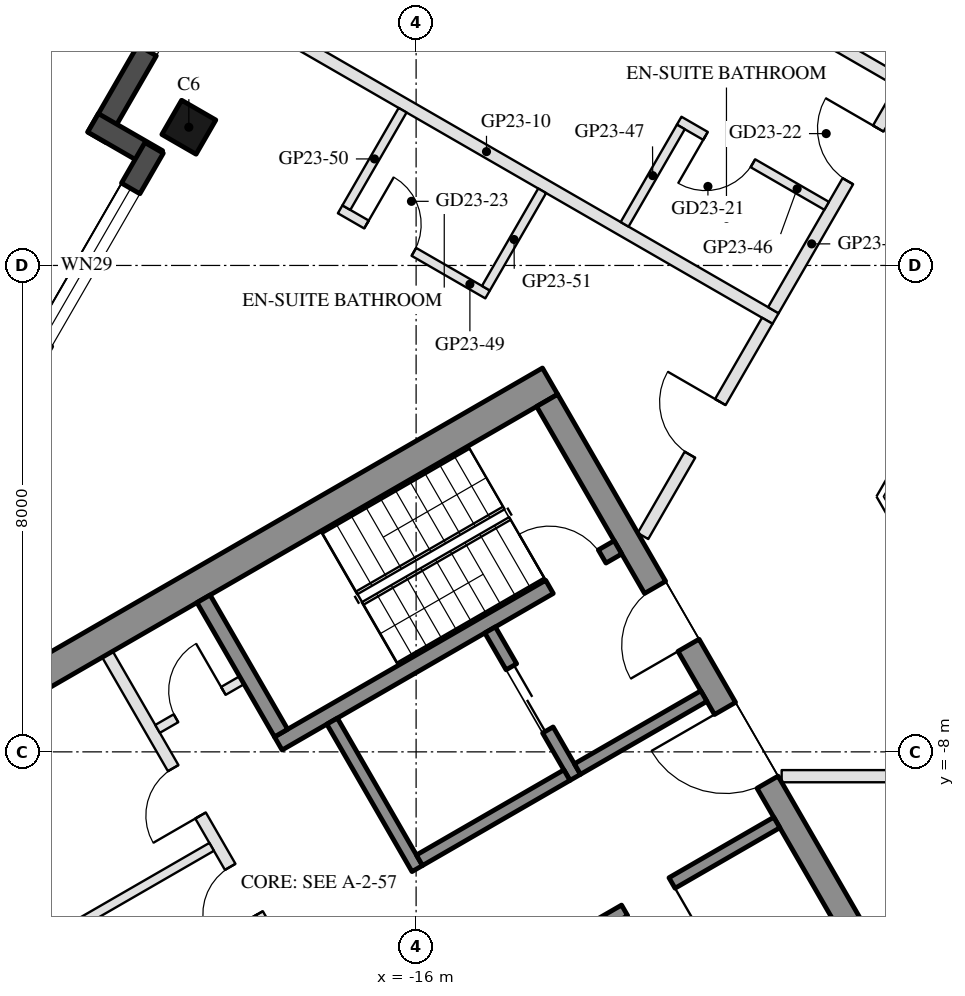
"""IFC4 building model, lengths in metres.
Left out: names, types, materials, properties, quantities, classifications, styles, units other than length and angle.
Written with IfcOpenShell. Run it as: python <this file> out.ifc"""

import sys

from ifc_helpers import new_model, si_unit, direction, frame, frame_2d, origin, origin_2d, place, context, subcontext, project, spatial, rectangle, hollow_rectangle, extrude, element, fill, save


model = new_model("IFC4")
c1 = context("Model", 3, precision=1e-05, world=origin(), true_north=direction((0.0, 1.0)))
c2 = subcontext(c1, "Body", "Model", "MODEL_VIEW")
j1 = project(units=[si_unit("LENGTHUNIT", "METRE"), si_unit("PLANEANGLEUNIT", "RADIAN")], contexts=[c1])
p1 = place(None, origin())
s1 = spatial("IfcSite", under=j1, at=p1, CompositionType="ELEMENT")
p2 = place(p1, origin())
s2 = spatial("IfcBuilding", under=s1, at=p2, CompositionType="ELEMENT")
p3 = place(p2, frame((0.0, 0.0, 246.7)))
s3 = spatial("IfcBuildingStorey", under=s2, at=p3, CompositionType="ELEMENT", Elevation=246.7)
p4 = place(p3, frame((-19.738, 2.273, 0.0), z_axis=(0.0, 0.0, 1.0), x_axis=(0.5, 0.866025403784, 0.0)))
e1 = element("IfcColumn", 1, at=p4, inside=s3, PredefinedType="COLUMN", context=c2, shape_type="SweptSolid", body=[
    extrude(hollow_rectangle(XDim=0.65, YDim=0.65, WallThickness=0.03, at=origin_2d()), origin(), (0.0, 0.0, 1.0), 3.7),
])
p5 = place(p3, frame((-16.398, 10.507, 0.0), z_axis=(0.0, 0.0, 1.0), x_axis=(-0.499999142773, -0.866025898704, 0.0)))
e2 = element("IfcWall", 2, at=p5, inside=s3, PredefinedType="SOLIDWALL", context=c2, shape_type="SweptSolid", body=[
    extrude(rectangle(XDim=9.7, YDim=0.35, at=frame_2d((4.85, 0.0))), origin(), (0.0, 0.0, 1.0), 3.55),
])
p6 = place(p5, frame((2.75, 0.0, 0.0)))
e3 = element("IfcOpeningElement", 3, at=p6, cuts=e2, PredefinedType="OPENING", context=c2, shape_type="SweptSolid", body=[
    extrude(rectangle(XDim=1.8, YDim=2.4, at=frame_2d((0.9, 1.2))), frame((0.0, 0.185, 0.0), z_axis=(0.0, -1.0, 0.0), x_axis=(1.0, 0.0, 0.0)), (0.0, 0.0, 1.0), 0.37),
])
p7 = place(p5, frame((4.85, 0.0, 0.3)))
e4 = element("IfcOpeningElement", 4, at=p7, cuts=e2, PredefinedType="OPENING", context=c2, shape_type="SweptSolid", body=[
    extrude(rectangle(XDim=1.3, YDim=2.65, at=frame_2d((0.65, 1.325))), frame((0.0, 0.185, 0.0), z_axis=(0.0, -1.0, 0.0), x_axis=(1.0, 0.0, 0.0)), (0.0, 0.0, 1.0), 0.37),
])
p8 = place(p5, frame((7.15, 0.0, 0.3)))
e5 = element("IfcOpeningElement", 5, at=p8, cuts=e2, PredefinedType="OPENING", context=c2, shape_type="SweptSolid", body=[
    extrude(rectangle(XDim=0.9, YDim=2.65, at=frame_2d((0.45, 1.325))), frame((0.0, 0.185, 0.0), z_axis=(0.0, -1.0, 0.0), x_axis=(1.0, 0.0, 0.0)), (0.0, 0.0, 1.0), 0.37),
])
p9 = place(p3, frame((-21.312, 2.346, 0.0), z_axis=(0.0, 0.0, 1.0), x_axis=(0.866005645448, -0.500034220881, 0.0)))
e6 = element("IfcWall", 6, at=p9, inside=s3, PredefinedType="SOLIDWALL", context=c2, shape_type="SweptSolid", body=[
    extrude(rectangle(XDim=1.22, YDim=0.35, at=frame_2d((0.61, 0.0))), origin(), (0.0, 0.0, 1.0), 3.55),
])
p10 = place(p3, frame((-20.309, 1.934, 0.0), z_axis=(0.0, 0.0, 1.0), x_axis=(-0.499992114976, -0.866029956157, 0.0)))
e7 = element("IfcWall", 7, at=p10, inside=s3, PredefinedType="SOLIDWALL", context=c2, shape_type="SweptSolid", body=[
    extrude(rectangle(XDim=6.74, YDim=0.35, at=frame_2d((3.37, 0.0))), origin(), (0.0, 0.0, 1.0), 3.55),
])
p11 = place(p10, frame((4.02, 0.0, 0.0)))
e8 = element("IfcOpeningElement", 8, at=p11, cuts=e7, PredefinedType="OPENING", context=c2, shape_type="SweptSolid", body=[
    extrude(rectangle(XDim=2.4, YDim=2.4, at=frame_2d((1.2, 1.2))), frame((0.0, 0.185, 0.0), z_axis=(0.0, -1.0, 0.0), x_axis=(1.0, 0.0, 0.0)), (0.0, 0.0, 1.0), 0.37),
])
p12 = place(p10, frame((0.77, 0.0, 0.3)))
e9 = element("IfcOpeningElement", 9, at=p12, cuts=e7, PredefinedType="OPENING", context=c2, shape_type="SweptSolid", body=[
    extrude(rectangle(XDim=2.9, YDim=2.65, at=frame_2d((1.45, 1.325))), frame((0.0, 0.185, 0.0), z_axis=(0.0, -1.0, 0.0), x_axis=(1.0, 0.0, 0.0)), (0.0, 0.0, 1.0), 0.37),
])
p13 = place(p3, frame((-13.797, -1.903, 0.0), z_axis=(0.0, 0.0, 1.0), x_axis=(-0.866025009528, -0.500000682871, 0.0)))
e10 = element("IfcWall", 10, at=p13, inside=s3, PredefinedType="SHEAR", context=c2, shape_type="SweptSolid", body=[
    extrude(rectangle(XDim=14.837, YDim=0.5, at=frame_2d((7.418, 0.0))), origin(), (0.0, 0.0, 1.0), 3.5),
])
p14 = place(p3, frame((-13.845, -2.22, 0.0), z_axis=(0.0, 0.0, 1.0), x_axis=(0.500004234368, -0.866022959057, 0.0)))
e11 = element("IfcWall", 11, at=p14, inside=s3, PredefinedType="SHEAR", context=c2, shape_type="SweptSolid", body=[
    extrude(rectangle(XDim=10.0, YDim=0.4, at=frame_2d((5.0, 0.0))), origin(), (0.0, 0.0, 1.0), 3.5),
])
p15 = place(p14, frame((3.55, 0.0, 0.0)))
e12 = element("IfcOpeningElement", 12, at=p15, cuts=e11, PredefinedType="OPENING", context=c2, shape_type="SweptSolid", body=[
    extrude(rectangle(XDim=1.1, YDim=2.1, at=frame_2d((0.55, 1.05))), frame((0.0, 0.21, 0.0), z_axis=(0.0, -1.0, 0.0), x_axis=(1.0, 0.0, 0.0)), (0.0, 0.0, 1.0), 0.42),
])
p16 = place(p14, frame((5.85, 0.0, 0.0)))
e13 = element("IfcOpeningElement", 13, at=p16, cuts=e11, PredefinedType="OPENING", context=c2, shape_type="SweptSolid", body=[
    extrude(rectangle(XDim=1.4, YDim=2.1, at=frame_2d((0.7, 1.05))), frame((0.0, 0.21, 0.0), z_axis=(0.0, -1.0, 0.0), x_axis=(1.0, 0.0, 0.0)), (0.0, 0.0, 1.0), 0.42),
])
p17 = place(p3, frame((-12.681, -4.636, 0.0), z_axis=(0.0, 0.0, 1.0), x_axis=(-0.866021702275, -0.500006411147, 0.0)))
e14 = element("IfcWall", 14, at=p17, inside=s3, PredefinedType="SHEAR", context=c2, shape_type="SweptSolid", body=[
    extrude(rectangle(XDim=6.45, YDim=0.25, at=frame_2d((3.225, 0.0))), origin(), (0.0, 0.0, 1.0), 3.5),
])
p18 = place(p17, frame((0.3, 0.0, 0.0)))
e15 = element("IfcOpeningElement", 15, at=p18, cuts=e14, PredefinedType="OPENING", context=c2, shape_type="SweptSolid", body=[
    extrude(rectangle(XDim=1.0, YDim=2.1, at=frame_2d((0.5, 1.05))), frame((0.0, 0.135, 0.0), z_axis=(0.0, -1.0, 0.0), x_axis=(1.0, 0.0, 0.0)), (0.0, 0.0, 1.0), 0.27),
])
p19 = place(p3, frame((-19.496, -5.482, 0.0), z_axis=(0.0, 0.0, 1.0), x_axis=(0.499990435942, -0.866030925526, 0.0)))
e16 = element("IfcWall", 16, at=p19, inside=s3, PredefinedType="SHEAR", context=c2, shape_type="SweptSolid", body=[
    extrude(rectangle(XDim=2.55, YDim=0.25, at=frame_2d((1.275, 0.0))), origin(), (0.0, 0.0, 1.0), 3.5),
])
p20 = place(p3, frame((-17.381, -7.495, 0.0), z_axis=(0.0, 0.0, 1.0), x_axis=(0.500011755427, -0.866018616679, 0.0)))
e17 = element("IfcWall", 17, at=p20, inside=s3, PredefinedType="SHEAR", context=c2, shape_type="SweptSolid", body=[
    extrude(rectangle(XDim=2.8, YDim=0.2, at=frame_2d((1.4, 0.0))), origin(), (0.0, 0.0, 1.0), 3.5),
])
p21 = place(p3, frame((-14.783, -5.995, 0.0), z_axis=(0.0, 0.0, 1.0), x_axis=(0.49994636267, -0.866056369097, 0.0)))
e18 = element("IfcWall", 18, at=p21, inside=s3, PredefinedType="SHEAR", context=c2, shape_type="SweptSolid", body=[
    extrude(rectangle(XDim=2.8, YDim=0.2, at=frame_2d((1.4, 0.0))), origin(), (0.0, 0.0, 1.0), 3.5),
])
p22 = place(p21, frame((0.7, 0.0, 0.0)))
e19 = element("IfcOpeningElement", 19, at=p22, cuts=e18, PredefinedType="OPENING", context=c2, shape_type="SweptSolid", body=[
    extrude(rectangle(XDim=1.2, YDim=2.1, at=frame_2d((0.6, 1.05))), frame((0.0, 0.11, 0.0), z_axis=(0.0, -1.0, 0.0), x_axis=(1.0, 0.0, 0.0)), (0.0, 0.0, 1.0), 0.22),
])
p23 = place(p3, frame((-13.52, -8.383, 0.0), z_axis=(0.0, 0.0, 1.0), x_axis=(-0.866034573852, -0.49998411664, 0.0)))
e20 = element("IfcWall", 20, at=p23, inside=s3, PredefinedType="SHEAR", context=c2, shape_type="SweptSolid", body=[
    extrude(rectangle(XDim=2.8, YDim=0.2, at=frame_2d((1.4, 0.0))), origin(), (0.0, 0.0, 1.0), 3.5),
])
p24 = place(p3, frame((-11.268, -7.083, 0.0), z_axis=(0.0, 0.0, 1.0), x_axis=(-0.866050077142, -0.499957262057, 0.0)))
e21 = element("IfcWall", 21, at=p24, inside=s3, PredefinedType="SHEAR", context=c2, shape_type="SweptSolid", body=[
    extrude(rectangle(XDim=2.4, YDim=0.2, at=frame_2d((1.2, 0.0))), origin(), (0.0, 0.0, 1.0), 3.5),
])
p25 = place(p3, frame((-10.068, -9.162, 0.0), z_axis=(0.0, 0.0, 1.0), x_axis=(-0.866032725843, -0.499987317609, 0.0)))
e22 = element("IfcWall", 22, at=p25, inside=s3, PredefinedType="SHEAR", context=c2, shape_type="SweptSolid", body=[
    extrude(rectangle(XDim=10.16, YDim=0.2, at=frame_2d((5.08, 0.0))), origin(), (0.0, 0.0, 1.0), 3.5),
])
p26 = place(p25, frame((1.99, 0.0, 0.0)))
e23 = element("IfcOpeningElement", 23, at=p26, cuts=e22, PredefinedType="OPENING", context=c2, shape_type="SweptSolid", body=[
    extrude(rectangle(XDim=0.9, YDim=2.1, at=frame_2d((0.45, 1.05))), frame((0.0, 0.11, 0.0), z_axis=(0.0, -1.0, 0.0), x_axis=(1.0, 0.0, 0.0)), (0.0, 0.0, 1.0), 0.22),
])
p27 = place(p25, frame((7.07, 0.0, 0.0)))
e24 = element("IfcOpeningElement", 24, at=p27, cuts=e22, PredefinedType="OPENING", context=c2, shape_type="SweptSolid", body=[
    extrude(rectangle(XDim=0.9, YDim=2.1, at=frame_2d((0.45, 1.05))), frame((0.0, 0.11, 0.0), z_axis=(0.0, -1.0, 0.0), x_axis=(1.0, 0.0, 0.0)), (0.0, 0.0, 1.0), 0.22),
])
p28 = place(p3, frame((-21.076, -6.395, 0.0), z_axis=(0.0, 0.0, 1.0), x_axis=(0.50001468107, -0.866016927499, 0.0)))
e25 = element("IfcWall", 25, at=p28, inside=s3, PredefinedType="PARTITIONING", context=c2, shape_type="SweptSolid", body=[
    extrude(rectangle(XDim=5.4, YDim=0.2, at=frame_2d((2.7, 0.0))), origin(), (0.0, 0.0, 1.0), 3.5),
])
p29 = place(p28, frame((2.163, 0.0, 0.0)))
e26 = element("IfcOpeningElement", 26, at=p29, cuts=e25, PredefinedType="OPENING", context=c2, shape_type="SweptSolid", body=[
    extrude(rectangle(XDim=0.9, YDim=2.1, at=frame_2d((0.45, 1.05))), frame((0.0, 0.11, 0.0), z_axis=(0.0, -1.0, 0.0), x_axis=(1.0, 0.0, 0.0)), (0.0, 0.0, 1.0), 0.22),
])
p30 = place(p28, frame((4.038, 0.0, 0.0)))
e27 = element("IfcOpeningElement", 27, at=p30, cuts=e25, PredefinedType="OPENING", context=c2, shape_type="SweptSolid", body=[
    extrude(rectangle(XDim=0.9, YDim=2.1, at=frame_2d((0.45, 1.05))), frame((0.0, 0.11, 0.0), z_axis=(0.0, -1.0, 0.0), x_axis=(1.0, 0.0, 0.0)), (0.0, 0.0, 1.0), 0.22),
])
p31 = place(p3, frame((-18.866, -6.822, 0.0), z_axis=(0.0, 0.0, 1.0), x_axis=(-0.866028054938, -0.499995408039, 0.0)))
e28 = element("IfcWall", 28, at=p31, inside=s3, PredefinedType="PARTITIONING", context=c2, shape_type="SweptSolid", body=[
    extrude(rectangle(XDim=1.6, YDim=0.15, at=frame_2d((0.8, 0.0))), origin(), (0.0, 0.0, 1.0), 3.5),
])
p32 = place(p31, frame((0.35, 0.0, 0.0)))
e29 = element("IfcOpeningElement", 29, at=p32, cuts=e28, PredefinedType="OPENING", context=c2, shape_type="SweptSolid", body=[
    extrude(rectangle(XDim=0.9, YDim=2.1, at=frame_2d((0.45, 1.05))), frame((0.0, 0.085, 0.0), z_axis=(0.0, -1.0, 0.0), x_axis=(1.0, 0.0, 0.0)), (0.0, 0.0, 1.0), 0.17),
])
p33 = place(p3, frame((-19.363, -9.562, 0.0), z_axis=(0.0, 0.0, 1.0), x_axis=(-0.866016523273, -0.500015381182, 0.0)))
e30 = element("IfcWall", 30, at=p33, inside=s3, PredefinedType="PARTITIONING", context=c2, shape_type="SweptSolid", body=[
    extrude(rectangle(XDim=6.95, YDim=0.15, at=frame_2d((3.475, 0.0))), origin(), (0.0, 0.0, 1.0), 3.5),
])
for number, where, z_axis, x_axis in (
    (31, (-17.397, 8.427, 0.0), (0.0, 0.0, 1.0), (0.866, -0.5, 0.0)),
    (32, (-19.597, 4.617, 0.0), (0.0, 0.0, 1.0), (0.866, -0.5, 0.0)),
):
    element("IfcWall", number, at=place(p3, frame(where, z_axis=z_axis, x_axis=x_axis)), inside=s3, PredefinedType="PARTITIONING", context=c2, shape_type="SweptSolid", body=[
        extrude(rectangle(XDim=10.98, YDim=0.2, at=frame_2d((5.49, 0.0))), origin(), (0.0, 0.0, 1.0), 3.16),
    ])
p34 = place(p3, frame((-4.807, -8.4, 0.0), z_axis=(0.0, 0.0, 1.0), x_axis=(-1.0, 0.0, 0.0)))
e33 = element("IfcWall", 33, at=p34, inside=s3, PredefinedType="PARTITIONING", context=c2, shape_type="SweptSolid", body=[
    extrude(rectangle(XDim=5.181, YDim=0.2, at=frame_2d((2.591, 0.0))), origin(), (0.0, 0.0, 1.0), 2.95),
])
p35 = place(p34, frame((2.091, 0.0, 0.0)))
e34 = element("IfcOpeningElement", 34, at=p35, cuts=e33, PredefinedType="OPENING", context=c2, shape_type="SweptSolid", body=[
    extrude(rectangle(XDim=1.0, YDim=2.1, at=frame_2d((0.5, 1.05))), frame((0.0, 0.11, 0.0), z_axis=(0.0, -1.0, 0.0), x_axis=(1.0, 0.0, 0.0)), (0.0, 0.0, 1.0), 0.22),
])
p36 = place(p3, frame((-10.125, -0.736, 0.0), z_axis=(0.0, 0.0, 1.0), x_axis=(0.49998411664, 0.866034573852, 0.0)))
e35 = element("IfcWall", 35, at=p36, inside=s3, PredefinedType="PARTITIONING", context=c2, shape_type="SweptSolid", body=[
    extrude(rectangle(XDim=4.2, YDim=0.2, at=frame_2d((2.1, 0.0))), origin(), (0.0, 0.0, 1.0), 2.95),
])
p37 = place(p36, frame((2.45, 0.0, 0.0)))
e36 = element("IfcOpeningElement", 36, at=p37, cuts=e35, PredefinedType="OPENING", context=c2, shape_type="SweptSolid", body=[
    extrude(rectangle(XDim=1.0, YDim=2.1, at=frame_2d((0.5, 1.05))), frame((0.0, 0.11, 0.0), z_axis=(0.0, -1.0, 0.0), x_axis=(1.0, 0.0, 0.0)), (0.0, 0.0, 1.0), 0.22),
])
p38 = place(p3, frame((-9.249, 0.981, 0.0), z_axis=(0.0, 0.0, 1.0), x_axis=(-0.865996816683, 0.500049511043, 0.0)))
e37 = element("IfcWall", 37, at=p38, inside=s3, PredefinedType="PARTITIONING", context=c2, shape_type="SweptSolid", body=[
    extrude(rectangle(XDim=2.8, YDim=0.15, at=frame_2d((1.4, 0.0))), origin(), (0.0, 0.0, 1.0), 2.95),
])
p39 = place(p38, frame((1.4, 0.0, 0.0)))
e38 = element("IfcOpeningElement", 38, at=p39, cuts=e37, PredefinedType="OPENING", context=c2, shape_type="SweptSolid", body=[
    extrude(rectangle(XDim=0.9, YDim=2.1, at=frame_2d((0.45, 1.05))), frame((0.0, 0.085, 0.0), z_axis=(0.0, -1.0, 0.0), x_axis=(1.0, 0.0, 0.0)), (0.0, 0.0, 1.0), 0.17),
])
p40 = place(p3, frame((-11.646, 2.278, 0.0), z_axis=(0.0, 0.0, 1.0), x_axis=(-0.500042316284, -0.866000971088, 0.0)))
e39 = element("IfcWall", 39, at=p40, inside=s3, PredefinedType="PARTITIONING", context=c2, shape_type="SweptSolid", body=[
    extrude(rectangle(XDim=1.85, YDim=0.15, at=frame_2d((0.925, 0.0))), origin(), (0.0, 0.0, 1.0), 2.95),
])
p41 = place(p3, frame((-12.269, -4.45, 0.0), z_axis=(0.0, 0.0, 1.0), x_axis=(0.500011931275, 0.86601851515, 0.0)))
e40 = element("IfcWall", 40, at=p41, inside=s3, PredefinedType="PARTITIONING", context=c2, shape_type="SweptSolid", body=[
    extrude(rectangle(XDim=4.088, YDim=0.2, at=frame_2d((2.044, 0.0))), origin(), (0.0, 0.0, 1.0), 2.95),
])
p42 = place(p41, frame((1.544, 0.0, 0.0)))
e41 = element("IfcOpeningElement", 41, at=p42, cuts=e40, PredefinedType="OPENING", context=c2, shape_type="SweptSolid", body=[
    extrude(rectangle(XDim=1.0, YDim=2.1, at=frame_2d((0.5, 1.05))), frame((0.0, 0.11, 0.0), z_axis=(0.0, -1.0, 0.0), x_axis=(1.0, 0.0, 0.0)), (0.0, 0.0, 1.0), 0.22),
])
p43 = place(p3, frame((-17.249, 0.923, 0.0), z_axis=(0.0, 0.0, 1.0), x_axis=(0.866034573852, -0.49998411664, 0.0)))
e42 = element("IfcWall", 42, at=p43, inside=s3, PredefinedType="PARTITIONING", context=c2, shape_type="SweptSolid", body=[
    extrude(rectangle(XDim=2.8, YDim=0.15, at=frame_2d((1.4, 0.0))), origin(), (0.0, 0.0, 1.0), 2.95),
])
p44 = place(p43, frame((0.5, 0.0, 0.0)))
e43 = element("IfcOpeningElement", 43, at=p44, cuts=e42, PredefinedType="OPENING", context=c2, shape_type="SweptSolid", body=[
    extrude(rectangle(XDim=0.9, YDim=2.1, at=frame_2d((0.45, 1.05))), frame((0.0, 0.085, 0.0), z_axis=(0.0, -1.0, 0.0), x_axis=(1.0, 0.0, 0.0)), (0.0, 0.0, 1.0), 0.17),
])
for number, where, z_axis, x_axis in (
    (44, (-16.222, 2.553, 0.0), (0.0, 0.0, 1.0), (-0.5, -0.866, 0.0)),
    (45, (-13.927, 1.228, 0.0), (0.0, 0.0, 1.0), (-0.5, -0.866, 0.0)),
):
    element("IfcWall", number, at=place(p3, frame(where, z_axis=z_axis, x_axis=x_axis)), inside=s3, PredefinedType="PARTITIONING", context=c2, shape_type="SweptSolid", body=[
        extrude(rectangle(XDim=1.85, YDim=0.15, at=frame_2d((0.925, 0.0))), origin(), (0.0, 0.0, 1.0), 3.55),
    ])
p45 = place(p12, origin())
e46 = element("IfcWindow", 46, at=p45, inside=s3, PartitioningType="SINGLE_PANEL", PredefinedType="WINDOW", context=c2, shape_type="SweptSolid", body=[
    extrude(rectangle(XDim=2.9, YDim=2.65, at=frame_2d((1.45, 1.325))), frame((0.0, 0.03, 0.0), z_axis=(0.0, -1.0, 0.0), x_axis=(1.0, 0.0, 0.0)), (0.0, 0.0, 1.0), 0.06),
])
fill(e9, e46)
p46 = place(p22, origin())
e47 = element("IfcDoor", 47, at=p46, inside=s3, OperationType="DOUBLE_DOOR_SLIDING", PredefinedType="DOOR", context=c2, shape_type="SweptSolid", body=[
    extrude(rectangle(XDim=1.2, YDim=2.1, at=frame_2d((0.6, 1.05))), frame((0.0, 0.025, 0.0), z_axis=(0.0, -1.0, 0.0), x_axis=(1.0, 0.0, 0.0)), (0.0, 0.0, 1.0), 0.05),
])
fill(e19, e47)
p47 = place(p32, frame((0.9, 0.0, 0.0), z_axis=(0.0, 0.0, 1.0), x_axis=(-1.0, 0.0, 0.0)))
e48 = element("IfcDoor", 48, at=p47, inside=s3, OperationType="SINGLE_SWING_RIGHT", PredefinedType="DOOR", context=c2, shape_type="SweptSolid", body=[
    extrude(rectangle(XDim=0.9, YDim=2.1, at=frame_2d((0.45, 1.05))), frame((0.0, 0.025, 0.0), z_axis=(0.0, -1.0, 0.0), x_axis=(1.0, 0.0, 0.0)), (0.0, 0.0, 1.0), 0.05),
])
fill(e29, e48)
p48 = place(p26, origin())
e49 = element("IfcDoor", 49, at=p48, inside=s3, OperationType="SINGLE_SWING_LEFT", PredefinedType="DOOR", context=c2, shape_type="SweptSolid", body=[
    extrude(rectangle(XDim=0.9, YDim=2.1, at=frame_2d((0.45, 1.05))), frame((0.0, 0.025, 0.0), z_axis=(0.0, -1.0, 0.0), x_axis=(1.0, 0.0, 0.0)), (0.0, 0.0, 1.0), 0.05),
])
fill(e23, e49)
p49 = place(p29, frame((0.9, 0.0, 0.0), z_axis=(0.0, 0.0, 1.0), x_axis=(-1.0, 0.0, 0.0)))
e50 = element("IfcDoor", 50, at=p49, inside=s3, OperationType="SINGLE_SWING_LEFT", PredefinedType="DOOR", context=c2, shape_type="SweptSolid", body=[
    extrude(rectangle(XDim=0.9, YDim=2.1, at=frame_2d((0.45, 1.05))), frame((0.0, 0.025, 0.0), z_axis=(0.0, -1.0, 0.0), x_axis=(1.0, 0.0, 0.0)), (0.0, 0.0, 1.0), 0.05),
])
fill(e26, e50)
p50 = place(p30, frame((0.9, 0.0, 0.0), z_axis=(0.0, 0.0, 1.0), x_axis=(-1.0, 0.0, 0.0)))
e51 = element("IfcDoor", 51, at=p50, inside=s3, OperationType="SINGLE_SWING_LEFT", PredefinedType="DOOR", context=c2, shape_type="SweptSolid", body=[
    extrude(rectangle(XDim=0.9, YDim=2.1, at=frame_2d((0.45, 1.05))), frame((0.0, 0.025, 0.0), z_axis=(0.0, -1.0, 0.0), x_axis=(1.0, 0.0, 0.0)), (0.0, 0.0, 1.0), 0.05),
])
fill(e27, e51)
p51 = place(p15, frame((1.1, 0.0, 0.0), z_axis=(0.0, 0.0, 1.0), x_axis=(-1.0, 0.0, 0.0)))
e52 = element("IfcDoor", 52, at=p51, inside=s3, OperationType="SINGLE_SWING_LEFT", PredefinedType="DOOR", context=c2, shape_type="SweptSolid", body=[
    extrude(rectangle(XDim=1.1, YDim=2.1, at=frame_2d((0.55, 1.05))), frame((0.0, 0.025, 0.0), z_axis=(0.0, -1.0, 0.0), x_axis=(1.0, 0.0, 0.0)), (0.0, 0.0, 1.0), 0.05),
])
fill(e12, e52)
p52 = place(p16, frame((1.4, 0.0, 0.0), z_axis=(0.0, 0.0, 1.0), x_axis=(-1.0, 0.0, 0.0)))
e53 = element("IfcDoor", 53, at=p52, inside=s3, OperationType="DOUBLE_DOOR_SINGLE_SWING", PredefinedType="DOOR", context=c2, shape_type="SweptSolid", body=[
    extrude(rectangle(XDim=1.4, YDim=2.1, at=frame_2d((0.7, 1.05))), frame((0.0, 0.025, 0.0), z_axis=(0.0, -1.0, 0.0), x_axis=(1.0, 0.0, 0.0)), (0.0, 0.0, 1.0), 0.05),
])
fill(e13, e53)
p53 = place(p18, frame((1.0, 0.0, 0.0), z_axis=(0.0, 0.0, 1.0), x_axis=(-1.0, 0.0, 0.0)))
e54 = element("IfcDoor", 54, at=p53, inside=s3, OperationType="SINGLE_SWING_LEFT", PredefinedType="DOOR", context=c2, shape_type="SweptSolid", body=[
    extrude(rectangle(XDim=1.0, YDim=2.1, at=frame_2d((0.5, 1.05))), frame((0.0, 0.025, 0.0), z_axis=(0.0, -1.0, 0.0), x_axis=(1.0, 0.0, 0.0)), (0.0, 0.0, 1.0), 0.05),
])
fill(e15, e54)
p54 = place(p39, origin())
e55 = element("IfcDoor", 55, at=p54, inside=s3, OperationType="SINGLE_SWING_RIGHT", PredefinedType="DOOR", context=c2, shape_type="SweptSolid", body=[
    extrude(rectangle(XDim=0.9, YDim=2.1, at=frame_2d((0.45, 1.05))), frame((0.0, 0.025, 0.0), z_axis=(0.0, -1.0, 0.0), x_axis=(1.0, 0.0, 0.0)), (0.0, 0.0, 1.0), 0.05),
])
fill(e38, e55)
p55 = place(p37, origin())
e56 = element("IfcDoor", 56, at=p55, inside=s3, OperationType="SINGLE_SWING_RIGHT", PredefinedType="DOOR", context=c2, shape_type="SweptSolid", body=[
    extrude(rectangle(XDim=1.0, YDim=2.1, at=frame_2d((0.5, 1.05))), frame((0.0, 0.025, 0.0), z_axis=(0.0, -1.0, 0.0), x_axis=(1.0, 0.0, 0.0)), (0.0, 0.0, 1.0), 0.05),
])
fill(e36, e56)
p56 = place(p44, origin())
e57 = element("IfcDoor", 57, at=p56, inside=s3, OperationType="SINGLE_SWING_LEFT", PredefinedType="DOOR", context=c2, shape_type="SweptSolid", body=[
    extrude(rectangle(XDim=0.9, YDim=2.1, at=frame_2d((0.45, 1.05))), frame((0.0, 0.025, 0.0), z_axis=(0.0, -1.0, 0.0), x_axis=(1.0, 0.0, 0.0)), (0.0, 0.0, 1.0), 0.05),
])
fill(e43, e57)
p57 = place(p42, origin())
e58 = element("IfcDoor", 58, at=p57, inside=s3, OperationType="SINGLE_SWING_RIGHT", PredefinedType="DOOR", context=c2, shape_type="SweptSolid", body=[
    extrude(rectangle(XDim=1.0, YDim=2.1, at=frame_2d((0.5, 1.05))), frame((0.0, 0.025, 0.0), z_axis=(0.0, -1.0, 0.0), x_axis=(1.0, 0.0, 0.0)), (0.0, 0.0, 1.0), 0.05),
])
fill(e41, e58)
save(model, sys.argv[1])
